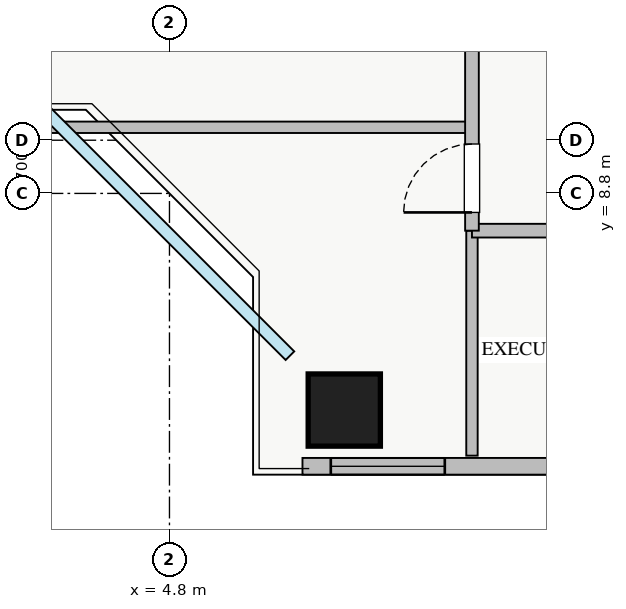
"""IFC4 building model, lengths in metres.
Left out: names, types, materials, properties, quantities, classifications, styles, units other than length and angle.
Written with IfcOpenShell. Run it as: python <this file> out.ifc"""

import sys

from ifc_helpers import new_model, si_unit, direction, frame, frame_2d, origin, origin_2d, place, context, subcontext, project, spatial, rectangle, extrude, source, transform, mapped, element, fill, save


model = new_model("IFC4")
c1 = context("Model", 3, precision=1e-05, world=origin(), true_north=direction((0.0, 1.0)))
c2 = subcontext(c1, "Body", "Model", "MODEL_VIEW")
j1 = project(units=[si_unit("LENGTHUNIT", "METRE"), si_unit("PLANEANGLEUNIT", "RADIAN")], contexts=[c1])
p1 = place(None, origin())
s1 = spatial("IfcSite", under=j1, at=p1, CompositionType="ELEMENT")
p2 = place(p1, origin())
s2 = spatial("IfcBuilding", under=s1, at=p2, CompositionType="ELEMENT")
p3 = place(p2, frame((0.0, 0.0, 173.0)))
s3 = spatial("IfcBuildingStorey", under=s2, at=p3, CompositionType="ELEMENT", Elevation=173.0)
m1 = source(origin(), c2, "Body", "SweptSolid", [
    extrude(rectangle(XDim=0.95, YDim=0.95, at=origin_2d()), origin(), (0.0, 0.0, 1.0), 3.25),
])
p4 = place(p3, frame((7.1, 5.95, 0.0), z_axis=(0.0, 0.0, 1.0), x_axis=(1.0, 0.0, 0.0)))
e1 = element("IfcColumn", 1, at=p4, inside=s3, PredefinedType="COLUMN", context=c2, shape_type="MappedRepresentation", body=[
    mapped(m1, transform((0.0, 0.0, 0.0), x_axis=(1.0, 0.0, 0.0), y_axis=(0.0, 1.0, 0.0), z_axis=(0.0, 0.0, 1.0), scale=1.0)),
])
p5 = place(p3, frame((6.55, 5.21, 0.0), z_axis=(0.0, 0.0, 1.0), x_axis=(1.0, 0.0, 0.0)))
e2 = element("IfcWall", 2, at=p5, inside=s3, PredefinedType="STANDARD", context=c2, shape_type="SweptSolid", body=[
    extrude(rectangle(XDim=24.9, YDim=0.22, at=frame_2d((12.45, 0.0))), origin(), (0.0, 0.0, 1.0), 2.54),
])
p6 = place(p5, frame((13.3, 0.0, 0.0)))
e3 = element("IfcOpeningElement", 3, at=p6, cuts=e2, PredefinedType="OPENING", context=c2, shape_type="SweptSolid", body=[
    extrude(rectangle(XDim=1.2, YDim=2.1, at=frame_2d((0.6, 1.05))), frame((0.0, 0.12, 0.0), z_axis=(0.0, -1.0, 0.0), x_axis=(1.0, 0.0, 0.0)), (0.0, 0.0, 1.0), 0.24),
])
p7 = place(p5, frame((0.373, 0.0, 0.9)))
e4 = element("IfcOpeningElement", 4, at=p7, cuts=e2, PredefinedType="OPENING", context=c2, shape_type="SweptSolid", body=[
    extrude(rectangle(XDim=1.5, YDim=1.5, at=frame_2d((0.75, 0.75))), frame((0.0, 0.12, 0.0), z_axis=(0.0, -1.0, 0.0), x_axis=(1.0, 0.0, 0.0)), (0.0, 0.0, 1.0), 0.24),
])
p8 = place(p5, frame((9.78, 0.0, 0.9)))
e5 = element("IfcOpeningElement", 5, at=p8, cuts=e2, PredefinedType="OPENING", context=c2, shape_type="SweptSolid", body=[
    extrude(rectangle(XDim=1.8, YDim=1.5, at=frame_2d((0.9, 0.75))), frame((0.0, 0.12, 0.0), z_axis=(0.0, -1.0, 0.0), x_axis=(1.0, 0.0, 0.0)), (0.0, 0.0, 1.0), 0.24),
])
p9 = place(p5, frame((14.813, 0.0, 0.9)))
e6 = element("IfcOpeningElement", 6, at=p9, cuts=e2, PredefinedType="OPENING", context=c2, shape_type="SweptSolid", body=[
    extrude(rectangle(XDim=1.5, YDim=1.45, at=frame_2d((0.75, 0.725))), frame((0.0, 0.12, 0.0), z_axis=(0.0, -1.0, 0.0), x_axis=(1.0, 0.0, 0.0)), (0.0, 0.0, 1.0), 0.24),
])
p10 = place(p5, frame((20.738, 0.0, 0.9)))
e7 = element("IfcOpeningElement", 7, at=p10, cuts=e2, PredefinedType="OPENING", context=c2, shape_type="SweptSolid", body=[
    extrude(rectangle(XDim=2.1, YDim=1.46, at=frame_2d((1.05, 0.73))), frame((0.0, 0.12, 0.0), z_axis=(0.0, -1.0, 0.0), x_axis=(1.0, 0.0, 0.0)), (0.0, 0.0, 1.0), 0.24),
])
p11 = place(p5, frame((4.152, 0.0, 0.9)))
e8 = element("IfcOpeningElement", 8, at=p11, cuts=e2, PredefinedType="OPENING", context=c2, shape_type="SweptSolid", body=[
    extrude(rectangle(XDim=2.4, YDim=1.5, at=frame_2d((1.2, 0.75))), frame((0.0, 0.12, 0.0), z_axis=(0.0, -1.0, 0.0), x_axis=(1.0, 0.0, 0.0)), (0.0, 0.0, 1.0), 0.24),
])
p12 = place(p3, frame((8.78, 5.35, 0.0), z_axis=(0.0, 0.0, 1.0), x_axis=(0.0, 1.0, 0.0)))
e9 = element("IfcWall", 9, at=p12, inside=s3, PredefinedType="PARTITIONING", context=c2, shape_type="SweptSolid", body=[
    extrude(rectangle(XDim=2.96, YDim=0.15, at=frame_2d((1.48, 0.0))), origin(), (0.0, 0.0, 1.0), 3.0),
])
p13 = place(p3, frame((8.78, 8.31, 0.0), z_axis=(0.0, 0.0, 1.0), x_axis=(1.0, 0.0, 0.0)))
e10 = element("IfcWall", 10, at=p13, inside=s3, PredefinedType="PARTITIONING", context=c2, shape_type="SweptSolid", body=[
    extrude(rectangle(XDim=23.54, YDim=0.18, at=frame_2d((11.77, 0.0))), origin(), (0.0, 0.0, 1.0), 3.0),
])
p14 = place(p13, frame((2.79, 0.0, 0.0)))
e11 = element("IfcOpeningElement", 11, at=p14, cuts=e10, PredefinedType="OPENING", context=c2, shape_type="SweptSolid", body=[
    extrude(rectangle(XDim=1.0, YDim=2.05, at=frame_2d((0.5, 1.025))), frame((0.0, 0.1, 0.0), z_axis=(0.0, -1.0, 0.0), x_axis=(1.0, 0.0, 0.0)), (0.0, 0.0, 1.0), 0.2),
])
p15 = place(p13, frame((7.95, 0.0, 0.0)))
e12 = element("IfcOpeningElement", 12, at=p15, cuts=e10, PredefinedType="OPENING", context=c2, shape_type="SweptSolid", body=[
    extrude(rectangle(XDim=1.0, YDim=2.05, at=frame_2d((0.5, 1.025))), frame((0.0, 0.1, 0.0), z_axis=(0.0, -1.0, 0.0), x_axis=(1.0, 0.0, 0.0)), (0.0, 0.0, 1.0), 0.2),
])
p16 = place(p13, frame((13.36, 0.0, 0.0)))
e13 = element("IfcOpeningElement", 13, at=p16, cuts=e10, PredefinedType="OPENING", context=c2, shape_type="SweptSolid", body=[
    extrude(rectangle(XDim=1.0, YDim=2.05, at=frame_2d((0.5, 1.025))), frame((0.0, 0.1, 0.0), z_axis=(0.0, -1.0, 0.0), x_axis=(1.0, 0.0, 0.0)), (0.0, 0.0, 1.0), 0.2),
])
p17 = place(p13, frame((19.8, 0.0, 0.0)))
e14 = element("IfcOpeningElement", 14, at=p17, cuts=e10, PredefinedType="OPENING", context=c2, shape_type="SweptSolid", body=[
    extrude(rectangle(XDim=1.0, YDim=2.05, at=frame_2d((0.5, 1.025))), frame((0.0, 0.1, 0.0), z_axis=(0.0, -1.0, 0.0), x_axis=(1.0, 0.0, 0.0)), (0.0, 0.0, 1.0), 0.2),
])
p18 = place(p3, frame((2.4, 9.67, 0.0), z_axis=(0.0, 0.0, 1.0), x_axis=(1.0, 0.0, 0.0)))
e15 = element("IfcWall", 15, at=p18, inside=s3, PredefinedType="PARTITIONING", context=c2, shape_type="SweptSolid", body=[
    extrude(rectangle(XDim=6.38, YDim=0.15, at=frame_2d((3.19, 0.0))), origin(), (0.0, 0.0, 1.0), 3.0),
])
p19 = place(p3, frame((8.78, 8.31, 0.0), z_axis=(0.0, 0.0, 1.0), x_axis=(0.0, 1.0, 0.0)))
e16 = element("IfcWall", 16, at=p19, inside=s3, PredefinedType="PARTITIONING", context=c2, shape_type="SweptSolid", body=[
    extrude(rectangle(XDim=29.34, YDim=0.18, at=frame_2d((14.67, 0.0))), origin(), (0.0, 0.0, 1.0), 3.0),
])
p20 = place(p19, frame((28.045, 0.0, 0.0)))
e17 = element("IfcOpeningElement", 17, at=p20, cuts=e16, PredefinedType="OPENING", context=c2, shape_type="SweptSolid", body=[
    extrude(rectangle(XDim=0.9, YDim=2.05, at=frame_2d((0.45, 1.025))), frame((0.0, 0.1, 0.0), z_axis=(0.0, -1.0, 0.0), x_axis=(1.0, 0.0, 0.0)), (0.0, 0.0, 1.0), 0.2),
])
p21 = place(p19, frame((0.24, 0.0, 0.0)))
e18 = element("IfcOpeningElement", 18, at=p21, cuts=e16, PredefinedType="OPENING", context=c2, shape_type="SweptSolid", body=[
    extrude(rectangle(XDim=0.9, YDim=2.05, at=frame_2d((0.45, 1.025))), frame((0.0, 0.1, 0.0), z_axis=(0.0, -1.0, 0.0), x_axis=(1.0, 0.0, 0.0)), (0.0, 0.0, 1.0), 0.2),
])
p22 = place(p19, frame((7.705, 0.0, 0.0)))
e19 = element("IfcOpeningElement", 19, at=p22, cuts=e16, PredefinedType="OPENING", context=c2, shape_type="SweptSolid", body=[
    extrude(rectangle(XDim=1.0, YDim=2.05, at=frame_2d((0.5, 1.025))), frame((0.0, 0.1, 0.0), z_axis=(0.0, -1.0, 0.0), x_axis=(1.0, 0.0, 0.0)), (0.0, 0.0, 1.0), 0.2),
])
p23 = place(p19, frame((17.39, 0.0, 0.0)))
e20 = element("IfcOpeningElement", 20, at=p23, cuts=e16, PredefinedType="OPENING", context=c2, shape_type="SweptSolid", body=[
    extrude(rectangle(XDim=1.0, YDim=2.05, at=frame_2d((0.5, 1.025))), frame((0.0, 0.1, 0.0), z_axis=(0.0, -1.0, 0.0), x_axis=(1.0, 0.0, 0.0)), (0.0, 0.0, 1.0), 0.2),
])
m2 = source(origin(), c2, "Body", "SweptSolid", [
    extrude(rectangle(XDim=1.5, YDim=1.5, at=frame_2d((0.75, 0.75))), frame((0.0, 0.03, 0.0), z_axis=(0.0, -1.0, 0.0), x_axis=(1.0, 0.0, 0.0)), (0.0, 0.0, 1.0), 0.06),
])
p24 = place(p7, origin())
e21 = element("IfcWindow", 21, at=p24, inside=s3, PartitioningType="TRIPLE_PANEL_VERTICAL", PredefinedType="WINDOW", context=c2, shape_type="MappedRepresentation", body=[
    mapped(m2, transform((0.0, 0.0, 0.0), x_axis=(1.0, 0.0, 0.0), y_axis=(0.0, 1.0, 0.0), z_axis=(0.0, 0.0, 1.0), scale=1.0)),
])
fill(e4, e21)
m3 = source(origin(), c2, "Body", "SweptSolid", [
    extrude(rectangle(XDim=0.9, YDim=2.05, at=frame_2d((0.45, 1.025))), frame((0.0, 0.025, 0.0), z_axis=(0.0, -1.0, 0.0), x_axis=(1.0, 0.0, 0.0)), (0.0, 0.0, 1.0), 0.05),
])
p25 = place(p21, origin())
e22 = element("IfcDoor", 22, at=p25, inside=s3, OperationType="SINGLE_SWING_LEFT", PredefinedType="DOOR", context=c2, shape_type="MappedRepresentation", body=[
    mapped(m3, transform((0.0, 0.0, 0.0), x_axis=(1.0, 0.0, 0.0), y_axis=(0.0, 1.0, 0.0), z_axis=(0.0, 0.0, 1.0), scale=1.0)),
])
fill(e18, e22)
save(model, sys.argv[1])
